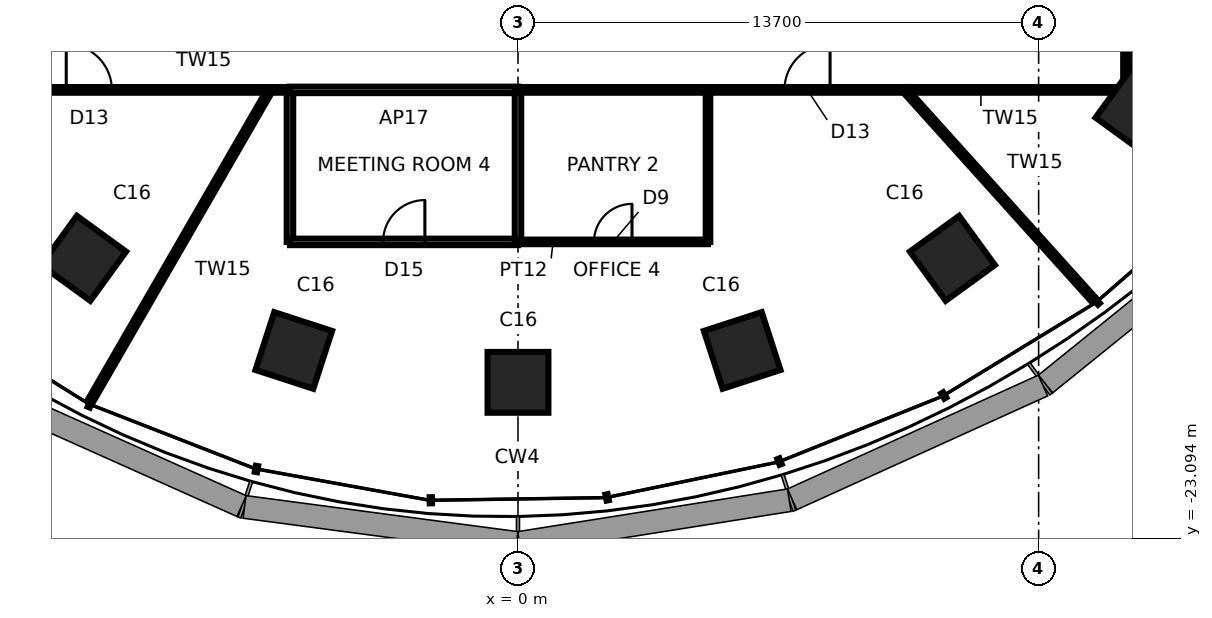
"""IFC4 building model, lengths in metres.
Left out: names, types, materials, properties, quantities, classifications, styles, units other than length and angle.
Written with IfcOpenShell. Run it as: python <this file> out.ifc"""

import sys

from ifc_helpers import new_model, si_unit, direction, frame, frame_2d, origin, origin_2d, place, context, subcontext, project, spatial, rectangle, extrude, element, fill, save


model = new_model("IFC4")
c1 = context("Model", 3, precision=1e-05, world=origin(), true_north=direction((0.0, 1.0)))
c2 = subcontext(c1, "Body", "Model", "MODEL_VIEW")
j1 = project(units=[si_unit("LENGTHUNIT", "METRE"), si_unit("PLANEANGLEUNIT", "RADIAN")], contexts=[c1])
p1 = place(None, origin())
s1 = spatial("IfcSite", under=j1, at=p1, CompositionType="ELEMENT")
p2 = place(p1, origin())
s2 = spatial("IfcBuilding", under=s1, at=p2, CompositionType="ELEMENT")
p3 = place(p2, frame((0.0, 0.0, 115.8)))
s3 = spatial("IfcBuildingStorey", under=s2, at=p3, CompositionType="ELEMENT", Elevation=115.8)
for number, where, z_axis, x_axis in (
    (1, (-11.43, -15.733, 0.0), (0.0, 0.0, 1.0), (-0.588, -0.809, 0.0)),
    (2, (-5.9, -18.157, 0.0), (0.0, 0.0, 1.0), (-0.309, -0.951, 0.0)),
    (3, (0.0, -18.996, 0.0), (0.0, 0.0, 1.0), (0.0, -1.0, 0.0)),
    (4, (5.9, -18.157, 0.0), (0.0, 0.0, 1.0), (0.309, -0.951, 0.0)),
    (5, (11.43, -15.733, 0.0), (0.0, 0.0, 1.0), (0.588, -0.809, 0.0)),
    (6, (16.315, -11.854, 0.0), (0.0, 0.0, 1.0), (0.809, -0.588, 0.0)),
):
    element("IfcColumn", number, at=place(p3, frame(where, z_axis=z_axis, x_axis=x_axis)), inside=s3, PredefinedType="COLUMN", context=c2, shape_type="SweptSolid", body=[
        extrude(rectangle(XDim=1.6, YDim=1.6, at=origin_2d()), origin(), (0.0, 0.0, 1.0), 3.9),
    ])
p4 = place(p3, frame((-16.0, -11.3, 0.0), z_axis=(0.0, 0.0, 1.0), x_axis=(1.0, 0.0, 0.0)))
e7 = element("IfcWall", 7, at=p4, inside=s3, PredefinedType="PARTITIONING", context=c2, shape_type="SweptSolid", body=[
    extrude(rectangle(XDim=10.0, YDim=0.15, at=frame_2d((5.0, 0.0))), origin(), (0.0, 0.0, 1.0), 3.74),
])
p5 = place(p4, frame((4.113, 0.0, 0.0)))
e8 = element("IfcOpeningElement", 8, at=p5, cuts=e7, PredefinedType="OPENING", context=c2, shape_type="SweptSolid", body=[
    extrude(rectangle(XDim=1.2, YDim=2.4, at=frame_2d((0.6, 1.2))), frame((0.0, 0.085, 0.0), z_axis=(0.0, -1.0, 0.0), x_axis=(1.0, 0.0, 0.0)), (0.0, 0.0, 1.0), 0.17),
])
p6 = place(p3, frame((-6.524, -11.3, 0.0), z_axis=(0.0, 0.0, 1.0), x_axis=(-0.499999424553, -0.866025736019, 0.0)))
e9 = element("IfcWall", 9, at=p6, inside=s3, PredefinedType="PARTITIONING", context=c2, shape_type="SweptSolid", body=[
    extrude(rectangle(XDim=9.461, YDim=0.15, at=frame_2d((4.731, 0.0))), origin(), (0.0, 0.0, 1.0), 3.74),
])
p7 = place(p3, frame((-6.0, -11.3, 0.0), z_axis=(0.0, 0.0, 1.0), x_axis=(0.0, -1.0, 0.0)))
e10 = element("IfcWall", 10, at=p7, inside=s3, PredefinedType="PARTITIONING", context=c2, shape_type="SweptSolid", body=[
    extrude(rectangle(XDim=4.0, YDim=0.17, at=frame_2d((2.0, 0.0))), origin(), (0.0, 0.0, 1.0), 3.74),
])
p8 = place(p3, frame((0.0, -11.3, 0.0), z_axis=(0.0, 0.0, 1.0), x_axis=(-1.0, 0.0, 0.0)))
e11 = element("IfcWall", 11, at=p8, inside=s3, PredefinedType="PARTITIONING", context=c2, shape_type="SweptSolid", body=[
    extrude(rectangle(XDim=6.0, YDim=0.17, at=frame_2d((3.0, 0.0))), origin(), (0.0, 0.0, 1.0), 3.74),
])
p9 = place(p3, frame((-6.0, -15.3, 0.0), z_axis=(0.0, 0.0, 1.0), x_axis=(1.0, 0.0, 0.0)))
e12 = element("IfcWall", 12, at=p9, inside=s3, PredefinedType="PARTITIONING", context=c2, shape_type="SweptSolid", body=[
    extrude(rectangle(XDim=6.0, YDim=0.17, at=frame_2d((3.0, 0.0))), origin(), (0.0, 0.0, 1.0), 3.286),
])
p10 = place(p9, frame((2.45, 0.0, 0.0)))
e13 = element("IfcOpeningElement", 13, at=p10, cuts=e12, PredefinedType="OPENING", context=c2, shape_type="SweptSolid", body=[
    extrude(rectangle(XDim=1.1, YDim=2.4, at=frame_2d((0.55, 1.2))), frame((0.0, 0.095, 0.0), z_axis=(0.0, -1.0, 0.0), x_axis=(1.0, 0.0, 0.0)), (0.0, 0.0, 1.0), 0.19),
])
p11 = place(p3, frame((0.0, -11.3, 0.0), z_axis=(0.0, 0.0, 1.0), x_axis=(0.0, -1.0, 0.0)))
e14 = element("IfcWall", 14, at=p11, inside=s3, PredefinedType="PARTITIONING", context=c2, shape_type="SweptSolid", body=[
    extrude(rectangle(XDim=4.0, YDim=0.17, at=frame_2d((2.0, 0.0))), origin(), (0.0, 0.0, 1.0), 2.94),
])
p12 = place(p3, frame((0.0, -15.3, 0.0), z_axis=(0.0, 0.0, 1.0), x_axis=(1.0, 0.0, 0.0)))
e15 = element("IfcWall", 15, at=p12, inside=s3, PredefinedType="PARTITIONING", context=c2, shape_type="SweptSolid", body=[
    extrude(rectangle(XDim=5.0, YDim=0.12, at=frame_2d((2.5, 0.0))), origin(), (0.0, 0.0, 1.0), 3.286),
])
p13 = place(p12, frame((2.0, 0.0, 0.0)))
e16 = element("IfcOpeningElement", 16, at=p13, cuts=e15, PredefinedType="OPENING", context=c2, shape_type="SweptSolid", body=[
    extrude(rectangle(XDim=1.0, YDim=2.4, at=frame_2d((0.5, 1.2))), frame((0.0, 0.07, 0.0), z_axis=(0.0, -1.0, 0.0), x_axis=(1.0, 0.0, 0.0)), (0.0, 0.0, 1.0), 0.14),
])
p14 = place(p3, frame((5.0, -15.3, 0.0), z_axis=(0.0, 0.0, 1.0), x_axis=(0.0, 1.0, 0.0)))
e17 = element("IfcWall", 17, at=p14, inside=s3, PredefinedType="PARTITIONING", context=c2, shape_type="SweptSolid", body=[
    extrude(rectangle(XDim=4.0, YDim=0.12, at=frame_2d((2.0, 0.0))), origin(), (0.0, 0.0, 1.0), 3.74),
])
p15 = place(p3, frame((0.0, -11.3, 0.0), z_axis=(0.0, 0.0, 1.0), x_axis=(1.0, 0.0, 0.0)))
e18 = element("IfcWall", 18, at=p15, inside=s3, PredefinedType="PARTITIONING", context=c2, shape_type="SweptSolid", body=[
    extrude(rectangle(XDim=16.0, YDim=0.15, at=frame_2d((8.0, 0.0))), origin(), (0.0, 0.0, 1.0), 3.74),
])
p16 = place(p15, frame((7.012, 0.0, 0.0)))
e19 = element("IfcOpeningElement", 19, at=p16, cuts=e18, PredefinedType="OPENING", context=c2, shape_type="SweptSolid", body=[
    extrude(rectangle(XDim=1.2, YDim=2.4, at=frame_2d((0.6, 1.2))), frame((0.0, 0.085, 0.0), z_axis=(0.0, -1.0, 0.0), x_axis=(1.0, 0.0, 0.0)), (0.0, 0.0, 1.0), 0.17),
])
p17 = place(p3, frame((15.156, -16.833, 0.0), z_axis=(0.0, 0.0, 1.0), x_axis=(-0.669129591277, 0.74314573946, 0.0)))
e20 = element("IfcWall", 20, at=p17, inside=s3, PredefinedType="PARTITIONING", context=c2, shape_type="SweptSolid", body=[
    extrude(rectangle(XDim=7.445, YDim=0.15, at=frame_2d((3.722, 0.0))), origin(), (0.0, 0.0, 1.0), 3.74),
])
p18 = place(p3, frame((16.0, -11.3, 0.0), z_axis=(0.0, 0.0, 1.0), x_axis=(0.0, 1.0, 0.0)))
e21 = element("IfcWall", 21, at=p18, inside=s3, PredefinedType="PARTITIONING", context=c2, shape_type="SweptSolid", body=[
    extrude(rectangle(XDim=8.3, YDim=0.15, at=frame_2d((4.15, 0.0))), origin(), (0.0, 0.0, 1.0), 3.74),
])
p19 = place(p10, origin())
e22 = element("IfcDoor", 22, at=p19, inside=s3, OperationType="SINGLE_SWING_RIGHT", PredefinedType="DOOR", context=c2, shape_type="SweptSolid", body=[
    extrude(rectangle(XDim=1.1, YDim=2.4, at=frame_2d((0.55, 1.2))), frame((0.0, 0.025, 0.0), z_axis=(0.0, -1.0, 0.0), x_axis=(1.0, 0.0, 0.0)), (0.0, 0.0, 1.0), 0.05),
])
fill(e13, e22)
p20 = place(p13, origin())
e23 = element("IfcDoor", 23, at=p20, inside=s3, OperationType="SINGLE_SWING_RIGHT", PredefinedType="DOOR", context=c2, shape_type="SweptSolid", body=[
    extrude(rectangle(XDim=1.0, YDim=2.4, at=frame_2d((0.5, 1.2))), frame((0.0, 0.025, 0.0), z_axis=(0.0, -1.0, 0.0), x_axis=(1.0, 0.0, 0.0)), (0.0, 0.0, 1.0), 0.05),
])
fill(e16, e23)
p21 = place(p5, origin())
e24 = element("IfcDoor", 24, at=p21, inside=s3, OperationType="SINGLE_SWING_LEFT", PredefinedType="DOOR", context=c2, shape_type="SweptSolid", body=[
    extrude(rectangle(XDim=1.2, YDim=2.4, at=frame_2d((0.6, 1.2))), frame((0.0, 0.025, 0.0), z_axis=(0.0, -1.0, 0.0), x_axis=(1.0, 0.0, 0.0)), (0.0, 0.0, 1.0), 0.05),
])
fill(e8, e24)
p22 = place(p16, origin())
e25 = element("IfcDoor", 25, at=p22, inside=s3, OperationType="SINGLE_SWING_RIGHT", PredefinedType="DOOR", context=c2, shape_type="SweptSolid", body=[
    extrude(rectangle(XDim=1.2, YDim=2.4, at=frame_2d((0.6, 1.2))), frame((0.0, 0.025, 0.0), z_axis=(0.0, -1.0, 0.0), x_axis=(1.0, 0.0, 0.0)), (0.0, 0.0, 1.0), 0.05),
])
fill(e19, e25)
save(model, sys.argv[1])
